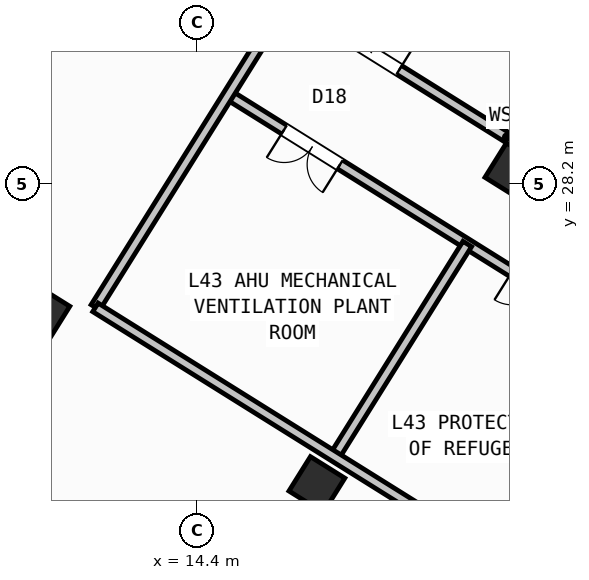
"""IFC4 building model, lengths in metres.
Left out: names, types, materials, properties, quantities, classifications, styles, units other than length and angle.
Written with IfcOpenShell. Run it as: python <this file> out.ifc"""

import sys

from ifc_helpers import new_model, si_unit, direction, frame, frame_2d, origin, origin_2d, place, context, subcontext, project, spatial, rectangle, hollow_rectangle, extrude, source, transform, mapped, element, fill, save


model = new_model("IFC4")
c1 = context("Model", 3, precision=1e-05, world=origin(), true_north=direction((0.0, 1.0)))
c2 = subcontext(c1, "Body", "Model", "MODEL_VIEW")
j1 = project(units=[si_unit("LENGTHUNIT", "METRE"), si_unit("PLANEANGLEUNIT", "RADIAN")], contexts=[c1])
p1 = place(None, origin())
s1 = spatial("IfcSite", under=j1, at=p1, CompositionType="ELEMENT")
p2 = place(p1, origin())
s2 = spatial("IfcBuilding", under=s1, at=p2, CompositionType="ELEMENT")
p3 = place(p2, frame((0.0, 0.0, 169.5)))
s3 = spatial("IfcBuildingStorey", under=s2, at=p3, CompositionType="ELEMENT", Elevation=169.5)
m1 = source(origin(), c2, "Body", "SweptSolid", [
    extrude(hollow_rectangle(XDim=0.8, YDim=0.8, WallThickness=0.032, at=origin_2d()), origin(), (0.0, 0.0, 1.0), 5.4),
])
for number, where, z_axis, x_axis in (
    (1, (20.632, 28.452, 0.0), (0.0, 0.0, 1.0), (-0.848, 0.53, 0.0)),
    (2, (16.764, 22.261, 0.0), (0.0, 0.0, 1.0), (-0.848, 0.53, 0.0)),
    (3, (11.336, 25.653, 0.0), (0.0, 0.0, 1.0), (-0.848, 0.53, 0.0)),
):
    element("IfcColumn", number, at=place(p3, frame(where, z_axis=z_axis, x_axis=x_axis)), inside=s3, PredefinedType="COLUMN", context=c2, shape_type="MappedRepresentation", body=[
        mapped(m1, transform((0.0, 0.0, 0.0), scale=1.0)),
    ])
p4 = place(p3, frame((29.268, 6.429, 0.0), z_axis=(0.0, 0.0, 1.0), x_axis=(-0.848049971435, 0.529916263149, 0.0)))
e4 = element("IfcWall", 4, at=p4, inside=s3, PredefinedType="STANDARD", context=c2, shape_type="SweptSolid", body=[
    extrude(rectangle(XDim=31.588, YDim=0.32, at=frame_2d((15.794, 0.0))), origin(), (0.0, 0.0, 1.0), 5.15),
])
p5 = place(p4, frame((6.007, 0.0, 0.95)))
e5 = element("IfcOpeningElement", 5, at=p5, cuts=e4, PredefinedType="OPENING", context=c2, shape_type="SweptSolid", body=[
    extrude(rectangle(XDim=1.25, YDim=1.4, at=frame_2d((0.625, 0.7))), frame((0.0, 0.17, 0.0), z_axis=(0.0, -1.0, 0.0), x_axis=(1.0, 0.0, 0.0)), (0.0, 0.0, 1.0), 0.34),
])
p6 = place(p3, frame((2.415, 23.452, 0.0), z_axis=(0.0, 0.0, 1.0), x_axis=(0.52991049553, 0.848053575387, 0.0)))
e6 = element("IfcWall", 6, at=p6, inside=s3, PredefinedType="STANDARD", context=c2, shape_type="SweptSolid", body=[
    extrude(rectangle(XDim=21.587, YDim=0.32, at=frame_2d((10.794, 0.0))), origin(), (0.0, 0.0, 1.0), 4.625),
])
p7 = place(p6, frame((3.294, 0.0, 0.95)))
e7 = element("IfcOpeningElement", 7, at=p7, cuts=e6, PredefinedType="OPENING", context=c2, shape_type="SweptSolid", body=[
    extrude(rectangle(XDim=1.25, YDim=1.4, at=frame_2d((0.625, 0.7))), frame((0.0, 0.17, 0.0), z_axis=(0.0, -1.0, 0.0), x_axis=(1.0, 0.0, 0.0)), (0.0, 0.0, 1.0), 0.34),
])
p8 = place(p6, frame((9.619, 0.0, 0.95)))
e8 = element("IfcOpeningElement", 8, at=p8, cuts=e6, PredefinedType="OPENING", context=c2, shape_type="SweptSolid", body=[
    extrude(rectangle(XDim=1.25, YDim=1.4, at=frame_2d((0.625, 0.7))), frame((0.0, 0.17, 0.0), z_axis=(0.0, -1.0, 0.0), x_axis=(1.0, 0.0, 0.0)), (0.0, 0.0, 1.0), 0.34),
])
p9 = place(p6, frame((16.919, 0.0, 0.95)))
e9 = element("IfcOpeningElement", 9, at=p9, cuts=e6, PredefinedType="OPENING", context=c2, shape_type="SweptSolid", body=[
    extrude(rectangle(XDim=1.25, YDim=1.4, at=frame_2d((0.625, 0.7))), frame((0.0, 0.17, 0.0), z_axis=(0.0, -1.0, 0.0), x_axis=(1.0, 0.0, 0.0)), (0.0, 0.0, 1.0), 0.34),
])
p10 = place(p3, frame((14.138, 41.825, 0.0), z_axis=(0.0, 0.0, 1.0), x_axis=(0.848046498049, -0.529921821731, 0.0)))
e10 = element("IfcWall", 10, at=p10, inside=s3, PredefinedType="STANDARD", context=c2, shape_type="SweptSolid", body=[
    extrude(rectangle(XDim=31.588, YDim=0.32, at=frame_2d((15.794, 0.0))), origin(), (0.0, 0.0, 1.0), 5.15),
])
p11 = place(p10, frame((2.369, 0.0, 0.95)))
e11 = element("IfcOpeningElement", 11, at=p11, cuts=e10, PredefinedType="OPENING", context=c2, shape_type="SweptSolid", body=[
    extrude(rectangle(XDim=1.25, YDim=1.4, at=frame_2d((0.625, 0.7))), frame((0.0, 0.17, 0.0), z_axis=(0.0, -1.0, 0.0), x_axis=(1.0, 0.0, 0.0)), (0.0, 0.0, 1.0), 0.34),
])
p12 = place(p10, frame((8.769, 0.0, 0.95)))
e12 = element("IfcOpeningElement", 12, at=p12, cuts=e10, PredefinedType="OPENING", context=c2, shape_type="SweptSolid", body=[
    extrude(rectangle(XDim=1.25, YDim=1.4, at=frame_2d((0.625, 0.7))), frame((0.0, 0.17, 0.0), z_axis=(0.0, -1.0, 0.0), x_axis=(1.0, 0.0, 0.0)), (0.0, 0.0, 1.0), 0.34),
])
p13 = place(p10, frame((15.169, 0.0, 0.95)))
e13 = element("IfcOpeningElement", 13, at=p13, cuts=e10, PredefinedType="OPENING", context=c2, shape_type="SweptSolid", body=[
    extrude(rectangle(XDim=1.25, YDim=1.4, at=frame_2d((0.625, 0.7))), frame((0.0, 0.17, 0.0), z_axis=(0.0, -1.0, 0.0), x_axis=(1.0, 0.0, 0.0)), (0.0, 0.0, 1.0), 0.34),
])
p14 = place(p10, frame((24.688, 0.0, 0.95)))
e14 = element("IfcOpeningElement", 14, at=p14, cuts=e10, PredefinedType="OPENING", context=c2, shape_type="SweptSolid", body=[
    extrude(rectangle(XDim=1.25, YDim=1.4, at=frame_2d((0.625, 0.7))), frame((0.0, 0.17, 0.0), z_axis=(0.0, -1.0, 0.0), x_axis=(1.0, 0.0, 0.0)), (0.0, 0.0, 1.0), 0.34),
])
p15 = place(p3, frame((24.832, 26.417, 0.0), z_axis=(0.0, 0.0, 1.0), x_axis=(-0.848045364107, 0.529923636401, 0.0)))
e15 = element("IfcWall", 15, at=p15, inside=s3, PredefinedType="STANDARD", context=c2, shape_type="SweptSolid", body=[
    extrude(rectangle(XDim=10.2, YDim=0.2, at=frame_2d((5.1, 0.0))), origin(), (0.0, 0.0, 1.0), 5.14),
])
p16 = place(p15, frame((2.3, 0.0, 0.0)))
e16 = element("IfcOpeningElement", 16, at=p16, cuts=e15, PredefinedType="OPENING", context=c2, shape_type="SweptSolid", body=[
    extrude(rectangle(XDim=1.3, YDim=2.15, at=frame_2d((0.65, 1.075))), frame((0.0, 0.11, 0.0), z_axis=(0.0, -1.0, 0.0), x_axis=(1.0, 0.0, 0.0)), (0.0, 0.0, 1.0), 0.22),
])
p17 = place(p15, frame((7.6, 0.0, 0.0)))
e17 = element("IfcOpeningElement", 17, at=p17, cuts=e15, PredefinedType="OPENING", context=c2, shape_type="SweptSolid", body=[
    extrude(rectangle(XDim=1.3, YDim=2.15, at=frame_2d((0.65, 1.075))), frame((0.0, 0.11, 0.0), z_axis=(0.0, -1.0, 0.0), x_axis=(1.0, 0.0, 0.0)), (0.0, 0.0, 1.0), 0.22),
])
p18 = place(p3, frame((23.666, 24.552, 0.0), z_axis=(0.0, 0.0, 1.0), x_axis=(-0.848038642463, 0.529934393004, 0.0)))
e18 = element("IfcWall", 18, at=p18, inside=s3, PredefinedType="STANDARD", context=c2, shape_type="SweptSolid", body=[
    extrude(rectangle(XDim=10.2, YDim=0.2, at=frame_2d((5.1, 0.0))), origin(), (0.0, 0.0, 1.0), 5.14),
])
p19 = place(p18, frame((2.3, 0.0, 0.0)))
e19 = element("IfcOpeningElement", 19, at=p19, cuts=e18, PredefinedType="OPENING", context=c2, shape_type="SweptSolid", body=[
    extrude(rectangle(XDim=1.3, YDim=2.15, at=frame_2d((0.65, 1.075))), frame((0.0, 0.11, 0.0), z_axis=(0.0, -1.0, 0.0), x_axis=(1.0, 0.0, 0.0)), (0.0, 0.0, 1.0), 0.22),
])
p20 = place(p18, frame((7.6, 0.0, 0.0)))
e20 = element("IfcOpeningElement", 20, at=p20, cuts=e18, PredefinedType="OPENING", context=c2, shape_type="SweptSolid", body=[
    extrude(rectangle(XDim=1.3, YDim=2.15, at=frame_2d((0.65, 1.075))), frame((0.0, 0.11, 0.0), z_axis=(0.0, -1.0, 0.0), x_axis=(1.0, 0.0, 0.0)), (0.0, 0.0, 1.0), 0.22),
])
p21 = place(p3, frame((19.441, 37.038, 0.0), z_axis=(0.0, 0.0, 1.0), x_axis=(-0.529936237412, -0.848037489901, 0.0)))
e21 = element("IfcWall", 21, at=p21, inside=s3, PredefinedType="STANDARD", context=c2, shape_type="SweptSolid", body=[
    extrude(rectangle(XDim=13.3, YDim=0.2, at=frame_2d((6.65, 0.0))), origin(), (0.0, 0.0, 1.0), 5.14),
])
p22 = place(p3, frame((23.666, 24.552, 0.0), z_axis=(0.0, 0.0, 1.0), x_axis=(-0.529912392506, -0.848052390049, 0.0)))
e22 = element("IfcWall", 22, at=p22, inside=s3, PredefinedType="STANDARD", context=c2, shape_type="SweptSolid", body=[
    extrude(rectangle(XDim=10.65, YDim=0.2, at=frame_2d((5.325, 0.0))), origin(), (0.0, 0.0, 1.0), 5.14),
])
p23 = place(p3, frame((19.731, 27.01, 0.0), z_axis=(0.0, 0.0, 1.0), x_axis=(-0.529896970672, -0.848062026312, 0.0)))
e23 = element("IfcWall", 23, at=p23, inside=s3, PredefinedType="STANDARD", context=c2, shape_type="SweptSolid", body=[
    extrude(rectangle(XDim=4.95, YDim=0.2, at=frame_2d((2.475, 0.0))), origin(), (0.0, 0.0, 1.0), 4.625),
])
p24 = place(p3, frame((21.043, 20.354, 0.0), z_axis=(0.0, 0.0, 1.0), x_axis=(-0.848045364107, 0.529923636401, 0.0)))
e24 = element("IfcWall", 24, at=p24, inside=s3, PredefinedType="STANDARD", context=c2, shape_type="SweptSolid", body=[
    extrude(rectangle(XDim=10.2, YDim=0.2, at=frame_2d((5.1, 0.0))), origin(), (0.0, 0.0, 1.0), 5.14),
])
m2 = source(origin(), c2, "Body", "SweptSolid", [
    extrude(rectangle(XDim=1.3, YDim=2.15, at=frame_2d((0.65, 1.075))), frame((0.0, 0.025, 0.0), z_axis=(0.0, -1.0, 0.0), x_axis=(1.0, 0.0, 0.0)), (0.0, 0.0, 1.0), 0.05),
])
p25 = place(p20, origin())
e25 = element("IfcDoor", 25, at=p25, inside=s3, OperationType="DOUBLE_DOOR_SINGLE_SWING", PredefinedType="DOOR", context=c2, shape_type="MappedRepresentation", body=[
    mapped(m2, transform((0.0, 0.0, 0.0), scale=1.0)),
])
fill(e20, e25)
p26 = place(p17, frame((1.3, 0.0, 0.0), z_axis=(0.0, 0.0, 1.0), x_axis=(-1.0, 0.0, 0.0)))
e26 = element("IfcDoor", 26, at=p26, inside=s3, OperationType="DOUBLE_DOOR_SINGLE_SWING", PredefinedType="DOOR", context=c2, shape_type="MappedRepresentation", body=[
    mapped(m2, transform((0.0, 0.0, 0.0), scale=1.0)),
])
fill(e17, e26)
save(model, sys.argv[1])
